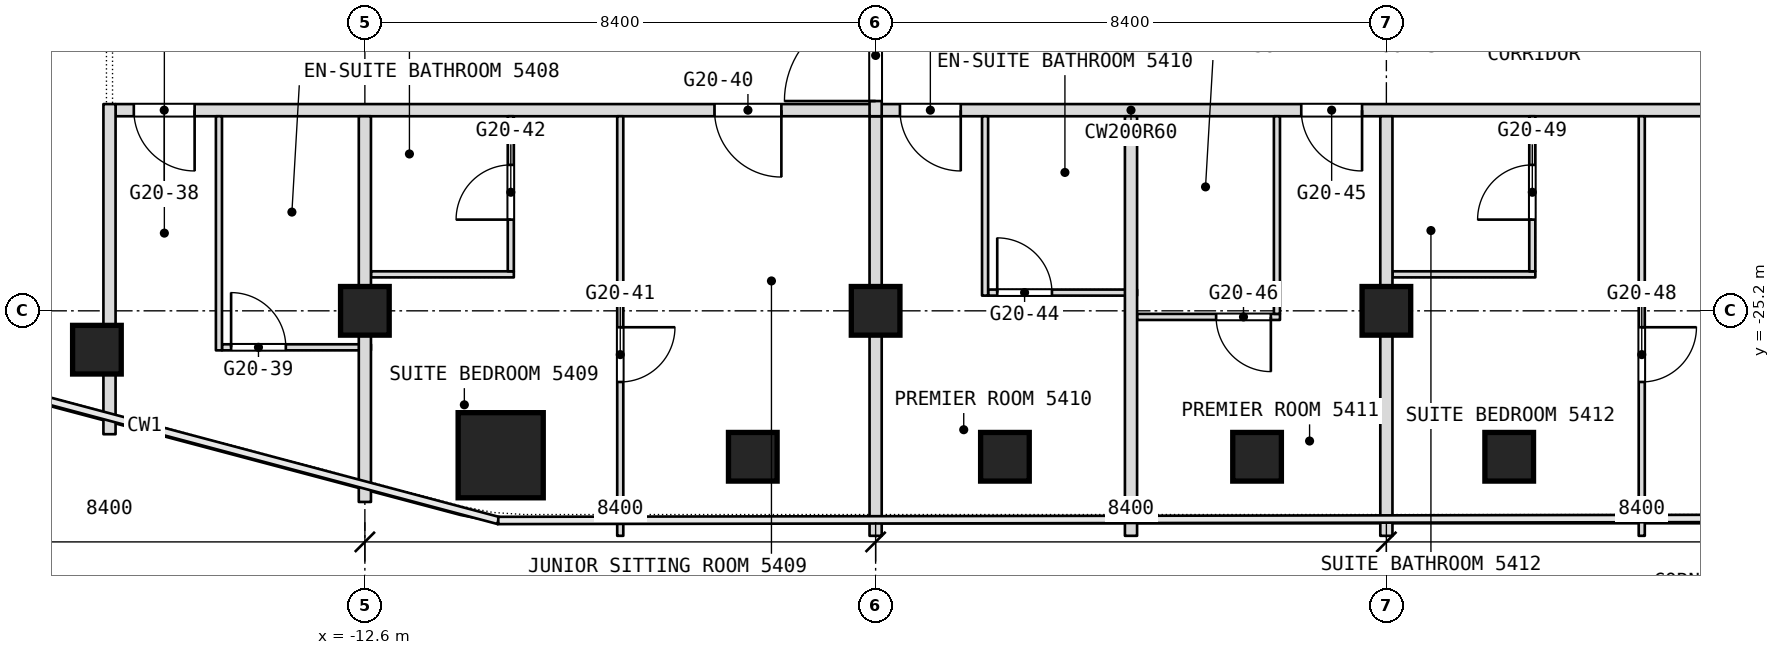
"""IFC4 building model, lengths in metres.
Left out: names, types, materials, properties, quantities, classifications, styles, units other than length and angle.
Written with IfcOpenShell. Run it as: python <this file> out.ifc"""

import sys

from ifc_helpers import new_model, si_unit, direction, frame, frame_2d, origin, origin_2d, place, context, subcontext, project, spatial, rectangle, extrude, element, fill, save


model = new_model("IFC4")
c1 = context("Model", 3, precision=1e-05, world=origin(), true_north=direction((0.0, 1.0)))
c2 = subcontext(c1, "Body", "Model", "MODEL_VIEW")
j1 = project(units=[si_unit("LENGTHUNIT", "METRE"), si_unit("PLANEANGLEUNIT", "RADIAN")], contexts=[c1])
p1 = place(None, origin())
s1 = spatial("IfcSite", under=j1, at=p1, CompositionType="ELEMENT")
p2 = place(p1, origin())
s2 = spatial("IfcBuilding", under=s1, at=p2, CompositionType="ELEMENT")
p3 = place(p2, frame((0.0, 0.0, 230.9)))
s3 = spatial("IfcBuildingStorey", under=s2, at=p3, CompositionType="ELEMENT", Elevation=230.9)
p4 = place(p3, frame((-10.366, -27.575, 0.0), z_axis=(0.0, 0.0, 1.0), x_axis=(1.0, 0.0, 0.0)))
e1 = element("IfcColumn", 1, at=p4, inside=s3, PredefinedType="COLUMN", context=c2, shape_type="SweptSolid", body=[
    extrude(rectangle(XDim=1.4, YDim=1.4, at=origin_2d()), origin(), (0.0, 0.0, 1.0), 3.6),
])
for number, where, z_axis, x_axis in (
    (2, (-12.6, -25.2, 0.0), (0.0, 0.0, 1.0), (1.0, 0.0, 0.0)),
    (3, (-4.2, -25.2, 0.0), (0.0, 0.0, 1.0), (1.0, 0.0, 0.0)),
    (4, (4.2, -25.2, 0.0), (0.0, 0.0, 1.0), (1.0, 0.0, 0.0)),
    (5, (6.22, -27.6, 0.0), (0.0, 0.0, 1.0), (1.0, 0.0, 0.0)),
    (6, (2.073, -27.6, 0.0), (0.0, 0.0, 1.0), (1.0, 0.0, 0.0)),
    (7, (-2.073, -27.6, 0.0), (0.0, 0.0, 1.0), (1.0, 0.0, 0.0)),
    (8, (-6.22, -27.6, 0.0), (0.0, 0.0, 1.0), (1.0, 0.0, 0.0)),
    (9, (-17.007, -25.839, 0.0), (0.0, 0.0, 1.0), (1.0, 0.0, 0.0)),
):
    element("IfcColumn", number, at=place(p3, frame(where, z_axis=z_axis, x_axis=x_axis)), inside=s3, PredefinedType="COLUMN", context=c2, shape_type="SweptSolid", body=[
        extrude(rectangle(XDim=0.8, YDim=0.8, at=origin_2d()), origin(), (0.0, 0.0, 1.0), 3.6),
    ])
p5 = place(p3, frame((-14.95, -25.8, 0.0), z_axis=(0.0, 0.0, 1.0), x_axis=(1.0, 0.0, 0.0)))
e10 = element("IfcWall", 10, at=p5, inside=s3, PredefinedType="PARTITIONING", context=c2, shape_type="SweptSolid", body=[
    extrude(rectangle(XDim=2.45, YDim=0.1, at=frame_2d((1.225, 0.0))), origin(), (0.0, 0.0, 1.0), 3.34),
])
p6 = place(p5, frame((0.15, 0.0, 0.0)))
e11 = element("IfcOpeningElement", 11, at=p6, cuts=e10, PredefinedType="OPENING", context=c2, shape_type="SweptSolid", body=[
    extrude(rectangle(XDim=0.9, YDim=2.1, at=frame_2d((0.45, 1.05))), frame((0.0, 0.05, 0.0), z_axis=(0.0, -1.0, 0.0), x_axis=(1.0, 0.0, 0.0)), (0.0, 0.0, 1.0), 0.1),
])
p7 = place(p3, frame((0.1, -25.3, 0.0), z_axis=(0.0, 0.0, 1.0), x_axis=(1.0, 0.0, 0.0)))
e12 = element("IfcWall", 12, at=p7, inside=s3, PredefinedType="PARTITIONING", context=c2, shape_type="SweptSolid", body=[
    extrude(rectangle(XDim=2.35, YDim=0.1, at=frame_2d((1.175, 0.0))), origin(), (0.0, 0.0, 1.0), 2.94),
])
p8 = place(p7, frame((1.3, 0.0, 0.0)))
e13 = element("IfcOpeningElement", 13, at=p8, cuts=e12, PredefinedType="OPENING", context=c2, shape_type="SweptSolid", body=[
    extrude(rectangle(XDim=0.9, YDim=2.1, at=frame_2d((0.45, 1.05))), frame((0.0, 0.05, 0.0), z_axis=(0.0, -1.0, 0.0), x_axis=(1.0, 0.0, 0.0)), (0.0, 0.0, 1.0), 0.1),
])
p9 = place(p3, frame((-2.35, -24.9, 0.0), z_axis=(0.0, 0.0, 1.0), x_axis=(1.0, 0.0, 0.0)))
e14 = element("IfcWall", 14, at=p9, inside=s3, PredefinedType="PARTITIONING", context=c2, shape_type="SweptSolid", body=[
    extrude(rectangle(XDim=2.45, YDim=0.1, at=frame_2d((1.225, 0.0))), origin(), (0.0, 0.0, 1.0), 3.34),
])
p10 = place(p9, frame((0.15, 0.0, 0.0)))
e15 = element("IfcOpeningElement", 15, at=p10, cuts=e14, PredefinedType="OPENING", context=c2, shape_type="SweptSolid", body=[
    extrude(rectangle(XDim=0.9, YDim=2.1, at=frame_2d((0.45, 1.05))), frame((0.0, 0.05, 0.0), z_axis=(0.0, -1.0, 0.0), x_axis=(1.0, 0.0, 0.0)), (0.0, 0.0, 1.0), 0.1),
])
p11 = place(p3, frame((-12.5, -24.6, 0.0), z_axis=(0.0, 0.0, 1.0), x_axis=(1.0, 0.0, 0.0)))
e16 = element("IfcWall", 16, at=p11, inside=s3, PredefinedType="PARTITIONING", context=c2, shape_type="SweptSolid", body=[
    extrude(rectangle(XDim=2.35, YDim=0.1, at=frame_2d((1.175, 0.0))), origin(), (0.0, 0.0, 1.0), 3.34),
])
p12 = place(p3, frame((4.3, -24.6, 0.0), z_axis=(0.0, 0.0, 1.0), x_axis=(1.0, 0.0, 0.0)))
e17 = element("IfcWall", 17, at=p12, inside=s3, PredefinedType="PARTITIONING", context=c2, shape_type="SweptSolid", body=[
    extrude(rectangle(XDim=2.35, YDim=0.1, at=frame_2d((1.175, 0.0))), origin(), (0.0, 0.0, 1.0), 3.34),
])
p13 = place(p3, frame((-16.7, -21.9, 0.0), z_axis=(0.0, 0.0, 1.0), x_axis=(1.0, 0.0, 0.0)))
e18 = element("IfcWall", 18, at=p13, inside=s3, PredefinedType="PARTITIONING", context=c2, shape_type="SweptSolid", body=[
    extrude(rectangle(XDim=33.4, YDim=0.2, at=frame_2d((16.7, 0.0))), origin(), (0.0, 0.0, 1.0), 3.34),
])
p14 = place(p13, frame((0.3, 0.0, 0.0)))
e19 = element("IfcOpeningElement", 19, at=p14, cuts=e18, PredefinedType="OPENING", context=c2, shape_type="SweptSolid", body=[
    extrude(rectangle(XDim=1.0, YDim=2.1, at=frame_2d((0.5, 1.05))), frame((0.0, 0.1, 0.0), z_axis=(0.0, -1.0, 0.0), x_axis=(1.0, 0.0, 0.0)), (0.0, 0.0, 1.0), 0.2),
])
p15 = place(p13, frame((9.85, 0.0, 0.0)))
e20 = element("IfcOpeningElement", 20, at=p15, cuts=e18, PredefinedType="OPENING", context=c2, shape_type="SweptSolid", body=[
    extrude(rectangle(XDim=1.1, YDim=2.1, at=frame_2d((0.55, 1.05))), frame((0.0, 0.1, 0.0), z_axis=(0.0, -1.0, 0.0), x_axis=(1.0, 0.0, 0.0)), (0.0, 0.0, 1.0), 0.2),
])
p16 = place(p13, frame((12.9, 0.0, 0.0)))
e21 = element("IfcOpeningElement", 21, at=p16, cuts=e18, PredefinedType="OPENING", context=c2, shape_type="SweptSolid", body=[
    extrude(rectangle(XDim=1.0, YDim=2.1, at=frame_2d((0.5, 1.05))), frame((0.0, 0.1, 0.0), z_axis=(0.0, -1.0, 0.0), x_axis=(1.0, 0.0, 0.0)), (0.0, 0.0, 1.0), 0.2),
])
p17 = place(p13, frame((19.5, 0.0, 0.0)))
e22 = element("IfcOpeningElement", 22, at=p17, cuts=e18, PredefinedType="OPENING", context=c2, shape_type="SweptSolid", body=[
    extrude(rectangle(XDim=1.0, YDim=2.1, at=frame_2d((0.5, 1.05))), frame((0.0, 0.1, 0.0), z_axis=(0.0, -1.0, 0.0), x_axis=(1.0, 0.0, 0.0)), (0.0, 0.0, 1.0), 0.2),
])
p18 = place(p13, frame((26.65, 0.0, 0.0)))
e23 = element("IfcOpeningElement", 23, at=p18, cuts=e18, PredefinedType="OPENING", context=c2, shape_type="SweptSolid", body=[
    extrude(rectangle(XDim=1.1, YDim=2.1, at=frame_2d((0.55, 1.05))), frame((0.0, 0.1, 0.0), z_axis=(0.0, -1.0, 0.0), x_axis=(1.0, 0.0, 0.0)), (0.0, 0.0, 1.0), 0.2),
])
p19 = place(p13, frame((29.7, 0.0, 0.0)))
e24 = element("IfcOpeningElement", 24, at=p19, cuts=e18, PredefinedType="OPENING", context=c2, shape_type="SweptSolid", body=[
    extrude(rectangle(XDim=1.0, YDim=2.1, at=frame_2d((0.5, 1.05))), frame((0.0, 0.1, 0.0), z_axis=(0.0, -1.0, 0.0), x_axis=(1.0, 0.0, 0.0)), (0.0, 0.0, 1.0), 0.2),
])
p20 = place(p3, frame((8.4, -28.9, 0.0), z_axis=(0.0, 0.0, 1.0), x_axis=(0.0, 1.0, 0.0)))
e25 = element("IfcWall", 25, at=p20, inside=s3, PredefinedType="PARTITIONING", context=c2, shape_type="SweptSolid", body=[
    extrude(rectangle(XDim=6.9, YDim=0.1, at=frame_2d((3.45, 0.0))), origin(), (0.0, 0.0, 1.0), 3.34),
])
p21 = place(p20, frame((2.53, 0.0, 0.0)))
e26 = element("IfcOpeningElement", 26, at=p21, cuts=e25, PredefinedType="OPENING", context=c2, shape_type="SweptSolid", body=[
    extrude(rectangle(XDim=0.9, YDim=2.1, at=frame_2d((0.45, 1.05))), frame((0.0, 0.05, 0.0), z_axis=(0.0, -1.0, 0.0), x_axis=(1.0, 0.0, 0.0)), (0.0, 0.0, 1.0), 0.1),
])
p22 = place(p3, frame((6.6, -24.55, 0.0), z_axis=(0.0, 0.0, 1.0), x_axis=(0.0, 1.0, 0.0)))
e27 = element("IfcWall", 27, at=p22, inside=s3, PredefinedType="PARTITIONING", context=c2, shape_type="SweptSolid", body=[
    extrude(rectangle(XDim=2.55, YDim=0.1, at=frame_2d((1.275, 0.0))), origin(), (0.0, 0.0, 1.0), 3.34),
])
p23 = place(p22, frame((0.85, 0.0, 0.0)))
e28 = element("IfcOpeningElement", 28, at=p23, cuts=e27, PredefinedType="OPENING", context=c2, shape_type="SweptSolid", body=[
    extrude(rectangle(XDim=0.9, YDim=2.1, at=frame_2d((0.45, 1.05))), frame((0.0, 0.05, 0.0), z_axis=(0.0, -1.0, 0.0), x_axis=(1.0, 0.0, 0.0)), (0.0, 0.0, 1.0), 0.1),
])
p24 = place(p3, frame((4.2, -28.9, 0.0), z_axis=(0.0, 0.0, 1.0), x_axis=(0.0, 1.0, 0.0)))
e29 = element("IfcWall", 29, at=p24, inside=s3, PredefinedType="PARTITIONING", context=c2, shape_type="SweptSolid", body=[
    extrude(rectangle(XDim=6.9, YDim=0.2, at=frame_2d((3.45, 0.0))), origin(), (0.0, 0.0, 1.0), 3.34),
])
p25 = place(p3, frame((2.4, -25.25, 0.0), z_axis=(0.0, 0.0, 1.0), x_axis=(0.0, 1.0, 0.0)))
e30 = element("IfcWall", 30, at=p25, inside=s3, PredefinedType="PARTITIONING", context=c2, shape_type="SweptSolid", body=[
    extrude(rectangle(XDim=3.25, YDim=0.1, at=frame_2d((1.625, 0.0))), origin(), (0.0, 0.0, 1.0), 3.34),
])
p26 = place(p3, frame((0.0, -28.9, 0.0), z_axis=(0.0, 0.0, 1.0), x_axis=(0.0, 1.0, 0.0)))
e31 = element("IfcWall", 31, at=p26, inside=s3, PredefinedType="PARTITIONING", context=c2, shape_type="SweptSolid", body=[
    extrude(rectangle(XDim=6.9, YDim=0.2, at=frame_2d((3.45, 0.0))), origin(), (0.0, 0.0, 1.0), 3.34),
])
p27 = place(p3, frame((-2.4, -24.95, 0.0), z_axis=(0.0, 0.0, 1.0), x_axis=(0.0, 1.0, 0.0)))
e32 = element("IfcWall", 32, at=p27, inside=s3, PredefinedType="PARTITIONING", context=c2, shape_type="SweptSolid", body=[
    extrude(rectangle(XDim=2.95, YDim=0.1, at=frame_2d((1.475, 0.0))), origin(), (0.0, 0.0, 1.0), 3.34),
])
p28 = place(p3, frame((-4.2, -28.9, 0.0), z_axis=(0.0, 0.0, 1.0), x_axis=(0.0, 1.0, 0.0)))
e33 = element("IfcWall", 33, at=p28, inside=s3, PredefinedType="PARTITIONING", context=c2, shape_type="SweptSolid", body=[
    extrude(rectangle(XDim=6.9, YDim=0.2, at=frame_2d((3.45, 0.0))), origin(), (0.0, 0.0, 1.0), 3.34),
])
p29 = place(p3, frame((-4.2, -22.0, 0.0), z_axis=(0.0, 0.0, 1.0), x_axis=(0.0, 1.0, 0.0)))
e34 = element("IfcWall", 34, at=p29, inside=s3, PredefinedType="PARTITIONING", context=c2, shape_type="SweptSolid", body=[
    extrude(rectangle(XDim=8.4, YDim=0.2, at=frame_2d((4.2, 0.0))), origin(), (0.0, 0.0, 1.0), 3.34),
])
p30 = place(p29, frame((0.25, 0.0, 0.0)))
e35 = element("IfcOpeningElement", 35, at=p30, cuts=e34, PredefinedType="OPENING", context=c2, shape_type="SweptSolid", body=[
    extrude(rectangle(XDim=1.5, YDim=2.1, at=frame_2d((0.75, 1.05))), frame((0.0, 0.1, 0.0), z_axis=(0.0, -1.0, 0.0), x_axis=(1.0, 0.0, 0.0)), (0.0, 0.0, 1.0), 0.2),
])
p31 = place(p3, frame((-8.4, -28.9, 0.0), z_axis=(0.0, 0.0, 1.0), x_axis=(0.0, 1.0, 0.0)))
e36 = element("IfcWall", 36, at=p31, inside=s3, PredefinedType="PARTITIONING", context=c2, shape_type="SweptSolid", body=[
    extrude(rectangle(XDim=6.9, YDim=0.1, at=frame_2d((3.45, 0.0))), origin(), (0.0, 0.0, 1.0), 3.34),
])
p32 = place(p31, frame((2.53, 0.0, 0.0)))
e37 = element("IfcOpeningElement", 37, at=p32, cuts=e36, PredefinedType="OPENING", context=c2, shape_type="SweptSolid", body=[
    extrude(rectangle(XDim=0.9, YDim=2.1, at=frame_2d((0.45, 1.05))), frame((0.0, 0.05, 0.0), z_axis=(0.0, -1.0, 0.0), x_axis=(1.0, 0.0, 0.0)), (0.0, 0.0, 1.0), 0.1),
])
p33 = place(p3, frame((-10.2, -24.55, 0.0), z_axis=(0.0, 0.0, 1.0), x_axis=(0.0, 1.0, 0.0)))
e38 = element("IfcWall", 38, at=p33, inside=s3, PredefinedType="PARTITIONING", context=c2, shape_type="SweptSolid", body=[
    extrude(rectangle(XDim=2.55, YDim=0.1, at=frame_2d((1.275, 0.0))), origin(), (0.0, 0.0, 1.0), 3.34),
])
p34 = place(p33, frame((0.85, 0.0, 0.0)))
e39 = element("IfcOpeningElement", 39, at=p34, cuts=e38, PredefinedType="OPENING", context=c2, shape_type="SweptSolid", body=[
    extrude(rectangle(XDim=0.9, YDim=2.1, at=frame_2d((0.45, 1.05))), frame((0.0, 0.05, 0.0), z_axis=(0.0, -1.0, 0.0), x_axis=(1.0, 0.0, 0.0)), (0.0, 0.0, 1.0), 0.1),
])
p35 = place(p3, frame((-12.6, -28.343, 0.0), z_axis=(0.0, 0.0, 1.0), x_axis=(0.0, 1.0, 0.0)))
e40 = element("IfcWall", 40, at=p35, inside=s3, PredefinedType="PARTITIONING", context=c2, shape_type="SweptSolid", body=[
    extrude(rectangle(XDim=6.343, YDim=0.2, at=frame_2d((3.171, 0.0))), origin(), (0.0, 0.0, 1.0), 3.34),
])
p36 = place(p3, frame((-15.0, -25.85, 0.0), z_axis=(0.0, 0.0, 1.0), x_axis=(0.0, 1.0, 0.0)))
e41 = element("IfcWall", 41, at=p36, inside=s3, PredefinedType="PARTITIONING", context=c2, shape_type="SweptSolid", body=[
    extrude(rectangle(XDim=3.85, YDim=0.1, at=frame_2d((1.925, 0.0))), origin(), (0.0, 0.0, 1.0), 3.34),
])
p37 = place(p3, frame((-16.8, -27.229, 0.0), z_axis=(0.0, 0.0, 1.0), x_axis=(0.0, 1.0, 0.0)))
e42 = element("IfcWall", 42, at=p37, inside=s3, PredefinedType="PARTITIONING", context=c2, shape_type="SweptSolid", body=[
    extrude(rectangle(XDim=5.429, YDim=0.2, at=frame_2d((2.714, 0.0))), origin(), (0.0, 0.0, 1.0), 3.34),
])
p38 = place(p6, origin())
e43 = element("IfcDoor", 43, at=p38, inside=s3, OperationType="SINGLE_SWING_LEFT", PredefinedType="DOOR", context=c2, shape_type="SweptSolid", body=[
    extrude(rectangle(XDim=0.9, YDim=2.1, at=frame_2d((0.45, 1.05))), frame((0.0, 0.025, 0.0), z_axis=(0.0, -1.0, 0.0), x_axis=(1.0, 0.0, 0.0)), (0.0, 0.0, 1.0), 0.05),
])
fill(e11, e43)
p39 = place(p8, origin())
e44 = element("IfcDoor", 44, at=p39, inside=s3, OperationType="SINGLE_SWING_RIGHT", PredefinedType="DOOR", context=c2, shape_type="SweptSolid", body=[
    extrude(rectangle(XDim=0.9, YDim=2.1, at=frame_2d((0.45, 1.05))), frame((0.0, 0.025, 0.0), z_axis=(0.0, -1.0, 0.0), x_axis=(1.0, 0.0, 0.0)), (0.0, 0.0, 1.0), 0.05),
])
fill(e13, e44)
p40 = place(p10, origin())
e45 = element("IfcDoor", 45, at=p40, inside=s3, OperationType="SINGLE_SWING_LEFT", PredefinedType="DOOR", context=c2, shape_type="SweptSolid", body=[
    extrude(rectangle(XDim=0.9, YDim=2.1, at=frame_2d((0.45, 1.05))), frame((0.0, 0.025, 0.0), z_axis=(0.0, -1.0, 0.0), x_axis=(1.0, 0.0, 0.0)), (0.0, 0.0, 1.0), 0.05),
])
fill(e15, e45)
p41 = place(p14, origin())
e46 = element("IfcDoor", 46, at=p41, inside=s3, OperationType="SINGLE_SWING_RIGHT", PredefinedType="DOOR", context=c2, shape_type="SweptSolid", body=[
    extrude(rectangle(XDim=1.0, YDim=2.1, at=frame_2d((0.5, 1.05))), frame((0.0, 0.025, 0.0), z_axis=(0.0, -1.0, 0.0), x_axis=(1.0, 0.0, 0.0)), (0.0, 0.0, 1.0), 0.05),
])
fill(e19, e46)
p42 = place(p15, origin())
e47 = element("IfcDoor", 47, at=p42, inside=s3, OperationType="SINGLE_SWING_RIGHT", PredefinedType="DOOR", context=c2, shape_type="SweptSolid", body=[
    extrude(rectangle(XDim=1.1, YDim=2.1, at=frame_2d((0.55, 1.05))), frame((0.0, 0.025, 0.0), z_axis=(0.0, -1.0, 0.0), x_axis=(1.0, 0.0, 0.0)), (0.0, 0.0, 1.0), 0.05),
])
fill(e20, e47)
p43 = place(p16, origin())
e48 = element("IfcDoor", 48, at=p43, inside=s3, OperationType="SINGLE_SWING_LEFT", PredefinedType="DOOR", context=c2, shape_type="SweptSolid", body=[
    extrude(rectangle(XDim=1.0, YDim=2.1, at=frame_2d((0.5, 1.05))), frame((0.0, 0.025, 0.0), z_axis=(0.0, -1.0, 0.0), x_axis=(1.0, 0.0, 0.0)), (0.0, 0.0, 1.0), 0.05),
])
fill(e21, e48)
p44 = place(p17, origin())
e49 = element("IfcDoor", 49, at=p44, inside=s3, OperationType="SINGLE_SWING_LEFT", PredefinedType="DOOR", context=c2, shape_type="SweptSolid", body=[
    extrude(rectangle(XDim=1.0, YDim=2.1, at=frame_2d((0.5, 1.05))), frame((0.0, 0.025, 0.0), z_axis=(0.0, -1.0, 0.0), x_axis=(1.0, 0.0, 0.0)), (0.0, 0.0, 1.0), 0.05),
])
fill(e22, e49)
p45 = place(p21, origin())
e50 = element("IfcDoor", 50, at=p45, inside=s3, OperationType="SINGLE_SWING_LEFT", PredefinedType="DOOR", context=c2, shape_type="SweptSolid", body=[
    extrude(rectangle(XDim=0.9, YDim=2.1, at=frame_2d((0.45, 1.05))), frame((0.0, 0.025, 0.0), z_axis=(0.0, -1.0, 0.0), x_axis=(1.0, 0.0, 0.0)), (0.0, 0.0, 1.0), 0.05),
])
fill(e26, e50)
p46 = place(p23, origin())
e51 = element("IfcDoor", 51, at=p46, inside=s3, OperationType="SINGLE_SWING_RIGHT", PredefinedType="DOOR", context=c2, shape_type="SweptSolid", body=[
    extrude(rectangle(XDim=0.9, YDim=2.1, at=frame_2d((0.45, 1.05))), frame((0.0, 0.025, 0.0), z_axis=(0.0, -1.0, 0.0), x_axis=(1.0, 0.0, 0.0)), (0.0, 0.0, 1.0), 0.05),
])
fill(e28, e51)
p47 = place(p32, origin())
e52 = element("IfcDoor", 52, at=p47, inside=s3, OperationType="SINGLE_SWING_LEFT", PredefinedType="DOOR", context=c2, shape_type="SweptSolid", body=[
    extrude(rectangle(XDim=0.9, YDim=2.1, at=frame_2d((0.45, 1.05))), frame((0.0, 0.025, 0.0), z_axis=(0.0, -1.0, 0.0), x_axis=(1.0, 0.0, 0.0)), (0.0, 0.0, 1.0), 0.05),
])
fill(e37, e52)
p48 = place(p34, origin())
e53 = element("IfcDoor", 53, at=p48, inside=s3, OperationType="SINGLE_SWING_RIGHT", PredefinedType="DOOR", context=c2, shape_type="SweptSolid", body=[
    extrude(rectangle(XDim=0.9, YDim=2.1, at=frame_2d((0.45, 1.05))), frame((0.0, 0.025, 0.0), z_axis=(0.0, -1.0, 0.0), x_axis=(1.0, 0.0, 0.0)), (0.0, 0.0, 1.0), 0.05),
])
fill(e39, e53)
p49 = place(p30, origin())
e54 = element("IfcDoor", 54, at=p49, inside=s3, OperationType="DOUBLE_DOOR_DOUBLE_SWING", PredefinedType="DOOR", context=c2, shape_type="SweptSolid", body=[
    extrude(rectangle(XDim=1.5, YDim=2.1, at=frame_2d((0.75, 1.05))), frame((0.0, 0.025, 0.0), z_axis=(0.0, -1.0, 0.0), x_axis=(1.0, 0.0, 0.0)), (0.0, 0.0, 1.0), 0.05),
])
fill(e35, e54)
save(model, sys.argv[1])
